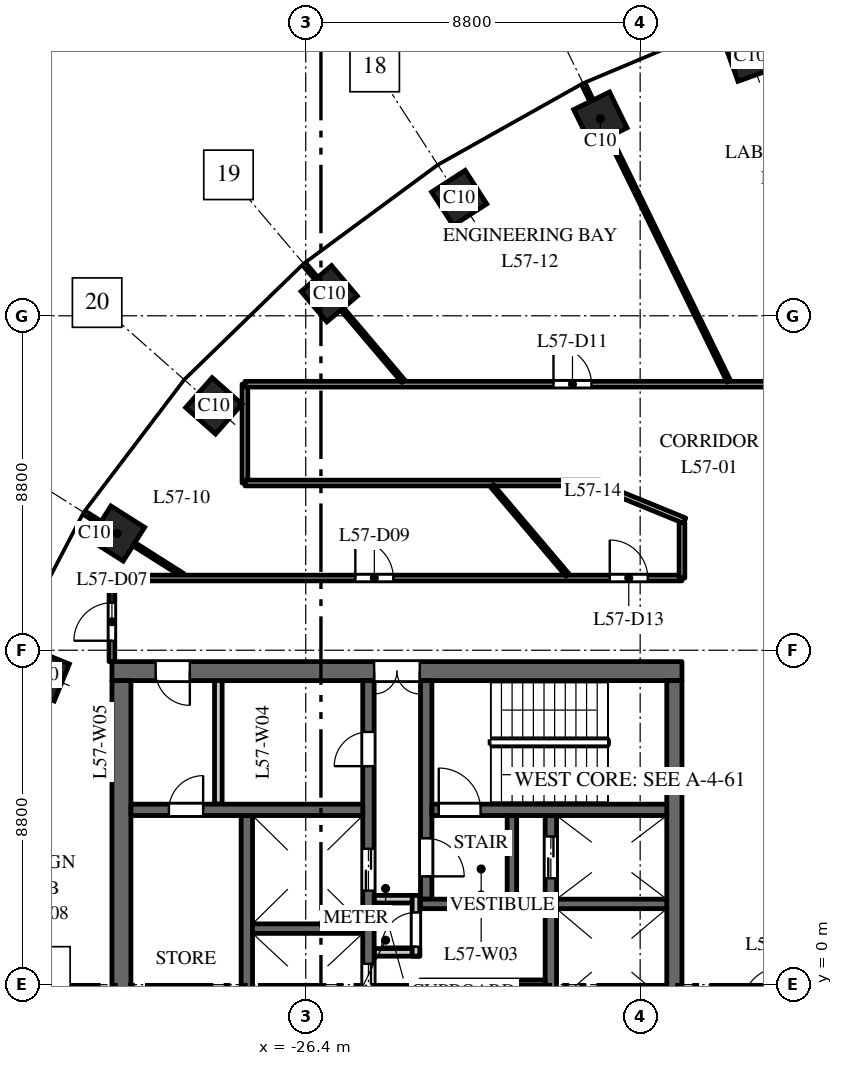
"""IFC4 building model, lengths in metres.
Left out: names, types, materials, properties, quantities, classifications, styles, units other than length and angle.
Written with IfcOpenShell. Run it as: python <this file> out.ifc"""

import sys

from ifc_helpers import new_model, si_unit, direction, frame, frame_2d, origin, origin_2d, place, context, subcontext, project, spatial, rectangle, extrude, element, fill, save


model = new_model("IFC4")
c1 = context("Model", 3, precision=1e-05, world=origin(), true_north=direction((0.0, 1.0)))
c2 = subcontext(c1, "Body", "Model", "MODEL_VIEW")
j1 = project(units=[si_unit("LENGTHUNIT", "METRE"), si_unit("PLANEANGLEUNIT", "RADIAN")], contexts=[c1])
p1 = place(None, origin())
s1 = spatial("IfcSite", under=j1, at=p1, CompositionType="ELEMENT")
p2 = place(p1, origin())
s2 = spatial("IfcBuilding", under=s1, at=p2, CompositionType="ELEMENT")
p3 = place(p2, frame((0.0, 0.0, 269.5)))
s3 = spatial("IfcBuildingStorey", under=s2, at=p3, CompositionType="ELEMENT", Elevation=269.5)
for number, where, z_axis, x_axis in (
    (1, (-14.709, 24.441, 0.0), (0.0, 0.0, 1.0), (-0.941, -0.338, 0.0)),
    (2, (-18.646, 22.785, 0.0), (0.0, 0.0, 1.0), (-0.898, -0.439, 0.0)),
    (3, (-22.362, 20.7, 0.0), (0.0, 0.0, 1.0), (-0.84, -0.542, 0.0)),
    (4, (-25.783, 18.18, 0.0), (0.0, 0.0, 1.0), (-0.763, -0.646, 0.0)),
    (5, (-28.819, 15.23, 0.0), (0.0, 0.0, 1.0), (-0.663, -0.749, 0.0)),
    (6, (-31.365, 11.871, 0.0), (0.0, 0.0, 1.0), (-0.535, -0.845, 0.0)),
    (7, (-33.305, 8.149, 0.0), (0.0, 0.0, 1.0), (-0.379, -0.925, 0.0)),
):
    element("IfcColumn", number, at=place(p3, frame(where, z_axis=z_axis, x_axis=x_axis)), inside=s3, PredefinedType="COLUMN", context=c2, shape_type="SweptSolid", body=[
        extrude(rectangle(XDim=1.05, YDim=1.05, at=origin_2d()), origin(), (0.0, 0.0, 1.0), 4.0),
    ])
p4 = place(p3, frame((-16.5, 8.25, 0.0), z_axis=(0.0, 0.0, 1.0), x_axis=(-1.0, 0.0, 0.0)))
e8 = element("IfcWall", 8, at=p4, inside=s3, PredefinedType="SHEAR", context=c2, shape_type="SweptSolid", body=[
    extrude(rectangle(XDim=15.0, YDim=0.5, at=frame_2d((7.5, 0.0))), origin(), (0.0, 0.0, 1.0), 3.7),
])
p5 = place(p4, frame((6.9, 0.0, 0.0)))
e9 = element("IfcOpeningElement", 9, at=p5, cuts=e8, PredefinedType="OPENING", context=c2, shape_type="SweptSolid", body=[
    extrude(rectangle(XDim=1.2, YDim=2.1, at=frame_2d((0.6, 1.05))), frame((0.0, 0.26, 0.0), z_axis=(0.0, -1.0, 0.0), x_axis=(1.0, 0.0, 0.0)), (0.0, 0.0, 1.0), 0.52),
])
p6 = place(p4, frame((12.95, 0.0, 0.0)))
e10 = element("IfcOpeningElement", 10, at=p6, cuts=e8, PredefinedType="OPENING", context=c2, shape_type="SweptSolid", body=[
    extrude(rectangle(XDim=0.9, YDim=2.1, at=frame_2d((0.45, 1.05))), frame((0.0, 0.26, 0.0), z_axis=(0.0, -1.0, 0.0), x_axis=(1.0, 0.0, 0.0)), (0.0, 0.0, 1.0), 0.52),
])
p7 = place(p3, frame((-27.95, -4.45, 0.0), z_axis=(0.0, 0.0, 1.0), x_axis=(0.0, 1.0, 0.0)))
e11 = element("IfcWall", 11, at=p7, inside=s3, PredefinedType="SHEAR", context=c2, shape_type="SweptSolid", body=[
    extrude(rectangle(XDim=8.9, YDim=0.3, at=frame_2d((4.45, 0.0))), origin(), (0.0, 0.0, 1.0), 3.7),
])
p8 = place(p3, frame((-19.95, -4.45, 0.0), z_axis=(0.0, 0.0, 1.0), x_axis=(0.0, 1.0, 0.0)))
e12 = element("IfcWall", 12, at=p8, inside=s3, PredefinedType="SHEAR", context=c2, shape_type="SweptSolid", body=[
    extrude(rectangle(XDim=8.9, YDim=0.3, at=frame_2d((4.45, 0.0))), origin(), (0.0, 0.0, 1.0), 3.7),
])
p9 = place(p8, frame((0.775, 0.0, 0.0)))
e13 = element("IfcOpeningElement", 13, at=p9, cuts=e12, PredefinedType="OPENING", context=c2, shape_type="SweptSolid", body=[
    extrude(rectangle(XDim=1.2, YDim=2.1, at=frame_2d((0.6, 1.05))), frame((0.0, 0.16, 0.0), z_axis=(0.0, -1.0, 0.0), x_axis=(1.0, 0.0, 0.0)), (0.0, 0.0, 1.0), 0.32),
])
p10 = place(p8, frame((7.25, 0.0, 0.0)))
e14 = element("IfcOpeningElement", 14, at=p10, cuts=e12, PredefinedType="OPENING", context=c2, shape_type="SweptSolid", body=[
    extrude(rectangle(XDim=1.1, YDim=2.1, at=frame_2d((0.55, 1.05))), frame((0.0, 0.16, 0.0), z_axis=(0.0, -1.0, 0.0), x_axis=(1.0, 0.0, 0.0)), (0.0, 0.0, 1.0), 0.32),
])
p11 = place(p3, frame((-24.75, -8.0, 0.0), z_axis=(0.0, 0.0, 1.0), x_axis=(0.0, 1.0, 0.0)))
e15 = element("IfcWall", 15, at=p11, inside=s3, PredefinedType="SHEAR", context=c2, shape_type="SweptSolid", body=[
    extrude(rectangle(XDim=16.0, YDim=0.3, at=frame_2d((8.0, 0.0))), origin(), (0.0, 0.0, 1.0), 3.7),
])
p12 = place(p11, frame((4.425, 0.0, 0.0)))
e16 = element("IfcOpeningElement", 16, at=p12, cuts=e15, PredefinedType="OPENING", context=c2, shape_type="SweptSolid", body=[
    extrude(rectangle(XDim=1.1, YDim=2.1, at=frame_2d((0.55, 1.05))), frame((0.0, 0.16, 0.0), z_axis=(0.0, -1.0, 0.0), x_axis=(1.0, 0.0, 0.0)), (0.0, 0.0, 1.0), 0.32),
])
p13 = place(p11, frame((7.45, 0.0, 0.0)))
e17 = element("IfcOpeningElement", 17, at=p13, cuts=e15, PredefinedType="OPENING", context=c2, shape_type="SweptSolid", body=[
    extrude(rectangle(XDim=1.1, YDim=2.1, at=frame_2d((0.55, 1.05))), frame((0.0, 0.16, 0.0), z_axis=(0.0, -1.0, 0.0), x_axis=(1.0, 0.0, 0.0)), (0.0, 0.0, 1.0), 0.32),
])
p14 = place(p11, frame((10.475, 0.0, 0.0)))
e18 = element("IfcOpeningElement", 18, at=p14, cuts=e15, PredefinedType="OPENING", context=c2, shape_type="SweptSolid", body=[
    extrude(rectangle(XDim=1.1, YDim=2.1, at=frame_2d((0.55, 1.05))), frame((0.0, 0.16, 0.0), z_axis=(0.0, -1.0, 0.0), x_axis=(1.0, 0.0, 0.0)), (0.0, 0.0, 1.0), 0.32),
])
p15 = place(p11, frame((13.75, 0.0, 0.0)))
e19 = element("IfcOpeningElement", 19, at=p15, cuts=e15, PredefinedType="OPENING", context=c2, shape_type="SweptSolid", body=[
    extrude(rectangle(XDim=0.9, YDim=2.1, at=frame_2d((0.45, 1.05))), frame((0.0, 0.16, 0.0), z_axis=(0.0, -1.0, 0.0), x_axis=(1.0, 0.0, 0.0)), (0.0, 0.0, 1.0), 0.32),
])
p16 = place(p11, frame((1.35, 0.0, 0.0)))
e20 = element("IfcOpeningElement", 20, at=p16, cuts=e15, PredefinedType="OPENING", context=c2, shape_type="SweptSolid", body=[
    extrude(rectangle(XDim=0.9, YDim=2.1, at=frame_2d((0.45, 1.05))), frame((0.0, 0.16, 0.0), z_axis=(0.0, -1.0, 0.0), x_axis=(1.0, 0.0, 0.0)), (0.0, 0.0, 1.0), 0.32),
])
p17 = place(p3, frame((-20.1, 0.0, 0.0), z_axis=(0.0, 0.0, 1.0), x_axis=(-1.0, 0.0, 0.0)))
e21 = element("IfcWall", 21, at=p17, inside=s3, PredefinedType="SHEAR", context=c2, shape_type="SweptSolid", body=[
    extrude(rectangle(XDim=3.28, YDim=0.25, at=frame_2d((1.64, 0.0))), origin(), (0.0, 0.0, 1.0), 3.7),
])
p18 = place(p3, frame((-16.7, -8.0, 0.0), z_axis=(0.0, 0.0, 1.0), x_axis=(0.0, 1.0, 0.0)))
e22 = element("IfcWall", 22, at=p18, inside=s3, PredefinedType="SHEAR", context=c2, shape_type="SweptSolid", body=[
    extrude(rectangle(XDim=16.0, YDim=0.4, at=frame_2d((8.0, 0.0))), origin(), (0.0, 0.0, 1.0), 3.7),
])
for number, where, z_axis, x_axis in (
    (23, (-23.4, 0.85, 0.0), (0.0, 0.0, 1.0), (-1.0, 0.0, 0.0)),
    (24, (-23.4, 2.25, 0.0), (0.0, 0.0, 1.0), (-1.0, 0.0, 0.0)),
):
    element("IfcWall", number, at=place(p3, frame(where, z_axis=z_axis, x_axis=x_axis)), inside=s3, PredefinedType="PARTITIONING", context=c2, shape_type="SweptSolid", body=[
        extrude(rectangle(XDim=1.2, YDim=0.2, at=frame_2d((0.6, 0.0))), origin(), (0.0, 0.0, 1.0), 3.7),
    ])
p19 = place(p3, frame((-23.5, 0.75, 0.0), z_axis=(0.0, 0.0, 1.0), x_axis=(0.0, 1.0, 0.0)))
e25 = element("IfcWall", 25, at=p19, inside=s3, PredefinedType="PARTITIONING", context=c2, shape_type="SweptSolid", body=[
    extrude(rectangle(XDim=1.6, YDim=0.2, at=frame_2d((0.8, 0.0))), origin(), (0.0, 0.0, 1.0), 3.7),
])
p20 = place(p19, frame((0.25, 0.0, 0.0)))
e26 = element("IfcOpeningElement", 26, at=p20, cuts=e25, PredefinedType="OPENING", context=c2, shape_type="SweptSolid", body=[
    extrude(rectangle(XDim=0.9, YDim=2.1, at=frame_2d((0.45, 1.05))), frame((0.0, 0.11, 0.0), z_axis=(0.0, -1.0, 0.0), x_axis=(1.0, 0.0, 0.0)), (0.0, 0.0, 1.0), 0.22),
])
p21 = place(p3, frame((-31.25, -8.0, 0.0), z_axis=(0.0, 0.0, 1.0), x_axis=(0.0, 1.0, 0.0)))
e27 = element("IfcWall", 27, at=p21, inside=s3, PredefinedType="SHEAR", context=c2, shape_type="SweptSolid", body=[
    extrude(rectangle(XDim=16.0, YDim=0.5, at=frame_2d((8.0, 0.0))), origin(), (0.0, 0.0, 1.0), 3.7),
])
p22 = place(p3, frame((-24.9, 4.6, 0.0), z_axis=(0.0, 0.0, 1.0), x_axis=(-1.0, 0.0, 0.0)))
e28 = element("IfcWall", 28, at=p22, inside=s3, PredefinedType="SHEAR", context=c2, shape_type="SweptSolid", body=[
    extrude(rectangle(XDim=6.1, YDim=0.3, at=frame_2d((3.05, 0.0))), origin(), (0.0, 0.0, 1.0), 3.7),
])
p23 = place(p22, frame((4.2, 0.0, 0.0)))
e29 = element("IfcOpeningElement", 29, at=p23, cuts=e28, PredefinedType="OPENING", context=c2, shape_type="SweptSolid", body=[
    extrude(rectangle(XDim=0.9, YDim=2.1, at=frame_2d((0.45, 1.05))), frame((0.0, 0.16, 0.0), z_axis=(0.0, -1.0, 0.0), x_axis=(1.0, 0.0, 0.0)), (0.0, 0.0, 1.0), 0.32),
])
p24 = place(p3, frame((-28.7, 4.75, 0.0), z_axis=(0.0, 0.0, 1.0), x_axis=(0.0, 1.0, 0.0)))
e30 = element("IfcWall", 30, at=p24, inside=s3, PredefinedType="PARTITIONING", context=c2, shape_type="SweptSolid", body=[
    extrude(rectangle(XDim=3.25, YDim=0.2, at=frame_2d((1.625, 0.0))), origin(), (0.0, 0.0, 1.0), 3.7),
])
for number, where, z_axis, x_axis in (
    (31, (-16.9, 2.125, 0.0), (0.0, 0.0, 1.0), (-1.0, 0.0, 0.0)),
    (32, (-24.9, 1.475, 0.0), (0.0, 0.0, 1.0), (-1.0, 0.0, 0.0)),
):
    element("IfcWall", number, at=place(p3, frame(where, z_axis=z_axis, x_axis=x_axis)), inside=s3, PredefinedType="SHEAR", context=c2, shape_type="SweptSolid", body=[
        extrude(rectangle(XDim=2.9, YDim=0.25, at=frame_2d((1.45, 0.0))), origin(), (0.0, 0.0, 1.0), 3.7),
    ])
p25 = place(p3, frame((-23.23, 2.25, 0.0), z_axis=(0.0, 0.0, 1.0), x_axis=(0.0, 1.0, 0.0)))
e33 = element("IfcWall", 33, at=p25, inside=s3, PredefinedType="SHEAR", context=c2, shape_type="SweptSolid", body=[
    extrude(rectangle(XDim=5.75, YDim=0.3, at=frame_2d((2.875, 0.0))), origin(), (0.0, 0.0, 1.0), 3.7),
])
p26 = place(p25, frame((0.6, 0.0, 0.0)))
e34 = element("IfcOpeningElement", 34, at=p26, cuts=e33, PredefinedType="OPENING", context=c2, shape_type="SweptSolid", body=[
    extrude(rectangle(XDim=1.0, YDim=2.1, at=frame_2d((0.5, 1.05))), frame((0.0, 0.16, 0.0), z_axis=(0.0, -1.0, 0.0), x_axis=(1.0, 0.0, 0.0)), (0.0, 0.0, 1.0), 0.32),
])
p27 = place(p3, frame((-16.9, 4.6, 0.0), z_axis=(0.0, 0.0, 1.0), x_axis=(-1.0, 0.0, 0.0)))
e35 = element("IfcWall", 35, at=p27, inside=s3, PredefinedType="SHEAR", context=c2, shape_type="SweptSolid", body=[
    extrude(rectangle(XDim=6.18, YDim=0.3, at=frame_2d((3.09, 0.0))), origin(), (0.0, 0.0, 1.0), 3.7),
])
p28 = place(p27, frame((4.9, 0.0, 0.0)))
e36 = element("IfcOpeningElement", 36, at=p28, cuts=e35, PredefinedType="OPENING", context=c2, shape_type="SweptSolid", body=[
    extrude(rectangle(XDim=1.1, YDim=2.1, at=frame_2d((0.55, 1.05))), frame((0.0, 0.16, 0.0), z_axis=(0.0, -1.0, 0.0), x_axis=(1.0, 0.0, 0.0)), (0.0, 0.0, 1.0), 0.32),
])
p29 = place(p3, frame((-20.85, 2.125, 0.0), z_axis=(0.0, 0.0, 1.0), x_axis=(-1.0, 0.0, 0.0)))
e37 = element("IfcWall", 37, at=p29, inside=s3, PredefinedType="SHEAR", context=c2, shape_type="SweptSolid", body=[
    extrude(rectangle(XDim=2.53, YDim=0.25, at=frame_2d((1.265, 0.0))), origin(), (0.0, 0.0, 1.0), 3.7),
])
p30 = place(p3, frame((-20.975, 2.25, 0.0), z_axis=(0.0, 0.0, 1.0), x_axis=(0.0, 1.0, 0.0)))
e38 = element("IfcWall", 38, at=p30, inside=s3, PredefinedType="SHEAR", context=c2, shape_type="SweptSolid", body=[
    extrude(rectangle(XDim=2.2, YDim=0.25, at=frame_2d((1.1, 0.0))), origin(), (0.0, 0.0, 1.0), 3.7),
])
p31 = place(p3, frame((-32.212, 12.408, 0.0), z_axis=(0.0, 0.0, 1.0), x_axis=(0.844810627195, -0.535065420467, 0.0)))
e39 = element("IfcWall", 39, at=p31, inside=s3, PredefinedType="PARTITIONING", context=c2, shape_type="SweptSolid", body=[
    extrude(rectangle(XDim=3.048, YDim=0.1, at=frame_2d((1.524, 0.0))), origin(), (0.0, 0.0, 1.0), 3.7),
])
p32 = place(p3, frame((-31.5, 8.5, 0.0), z_axis=(0.0, 0.0, 1.0), x_axis=(0.0, 1.0, 0.0)))
e40 = element("IfcWall", 40, at=p32, inside=s3, PredefinedType="PARTITIONING", context=c2, shape_type="SweptSolid", body=[
    extrude(rectangle(XDim=2.2, YDim=0.15, at=frame_2d((1.1, 0.0))), origin(), (0.0, 0.0, 1.0), 3.7),
])
p33 = place(p32, frame((0.55, 0.0, 0.0)))
e41 = element("IfcOpeningElement", 41, at=p33, cuts=e40, PredefinedType="OPENING", context=c2, shape_type="SweptSolid", body=[
    extrude(rectangle(XDim=1.0, YDim=2.1, at=frame_2d((0.5, 1.05))), frame((0.0, 0.085, 0.0), z_axis=(0.0, -1.0, 0.0), x_axis=(1.0, 0.0, 0.0)), (0.0, 0.0, 1.0), 0.17),
])
p34 = place(p3, frame((-31.5, 10.7, 0.0), z_axis=(0.0, 0.0, 1.0), x_axis=(1.0, 0.0, 0.0)))
e42 = element("IfcWall", 42, at=p34, inside=s3, PredefinedType="PARTITIONING", context=c2, shape_type="SweptSolid", body=[
    extrude(rectangle(XDim=15.0, YDim=0.15, at=frame_2d((7.5, 0.0))), origin(), (0.0, 0.0, 1.0), 3.1),
])
p35 = place(p34, frame((6.405, 0.0, 0.0)))
e43 = element("IfcOpeningElement", 43, at=p35, cuts=e42, PredefinedType="OPENING", context=c2, shape_type="SweptSolid", body=[
    extrude(rectangle(XDim=1.0, YDim=2.1, at=frame_2d((0.5, 1.05))), frame((0.0, 0.085, 0.0), z_axis=(0.0, -1.0, 0.0), x_axis=(1.0, 0.0, 0.0)), (0.0, 0.0, 1.0), 0.17),
])
p36 = place(p34, frame((13.1, 0.0, 0.0)))
e44 = element("IfcOpeningElement", 44, at=p36, cuts=e42, PredefinedType="OPENING", context=c2, shape_type="SweptSolid", body=[
    extrude(rectangle(XDim=1.0, YDim=2.1, at=frame_2d((0.5, 1.05))), frame((0.0, 0.085, 0.0), z_axis=(0.0, -1.0, 0.0), x_axis=(1.0, 0.0, 0.0)), (0.0, 0.0, 1.0), 0.17),
])
p37 = place(p3, frame((-28.0, 13.2, 0.0), z_axis=(0.0, 0.0, 1.0), x_axis=(0.0, 1.0, 0.0)))
e45 = element("IfcWall", 45, at=p37, inside=s3, PredefinedType="PARTITIONING", context=c2, shape_type="SweptSolid", body=[
    extrude(rectangle(XDim=2.6, YDim=0.15, at=frame_2d((1.3, 0.0))), origin(), (0.0, 0.0, 1.0), 3.0),
])
p38 = place(p3, frame((-28.0, 13.2, 0.0), z_axis=(0.0, 0.0, 1.0), x_axis=(1.0, 0.0, 0.0)))
e46 = element("IfcWall", 46, at=p38, inside=s3, PredefinedType="PARTITIONING", context=c2, shape_type="SweptSolid", body=[
    extrude(rectangle(XDim=9.347, YDim=0.15, at=frame_2d((4.673, 0.0))), origin(), (0.0, 0.0, 1.0), 2.75),
])
p39 = place(p3, frame((-28.0, 15.8, 0.0), z_axis=(0.0, 0.0, 1.0), x_axis=(1.0, 0.0, 0.0)))
e47 = element("IfcWall", 47, at=p39, inside=s3, PredefinedType="PARTITIONING", context=c2, shape_type="SweptSolid", body=[
    extrude(rectangle(XDim=19.809, YDim=0.15, at=frame_2d((9.905, 0.0))), origin(), (0.0, 0.0, 1.0), 2.75),
])
p40 = place(p39, frame((8.119, 0.0, 0.0)))
e48 = element("IfcOpeningElement", 48, at=p40, cuts=e47, PredefinedType="OPENING", context=c2, shape_type="SweptSolid", body=[
    extrude(rectangle(XDim=1.0, YDim=2.1, at=frame_2d((0.5, 1.05))), frame((0.0, 0.085, 0.0), z_axis=(0.0, -1.0, 0.0), x_axis=(1.0, 0.0, 0.0)), (0.0, 0.0, 1.0), 0.17),
])
p41 = place(p39, frame((15.909, 0.0, 0.0)))
e49 = element("IfcOpeningElement", 49, at=p41, cuts=e47, PredefinedType="OPENING", context=c2, shape_type="SweptSolid", body=[
    extrude(rectangle(XDim=1.0, YDim=2.1, at=frame_2d((0.5, 1.05))), frame((0.0, 0.085, 0.0), z_axis=(0.0, -1.0, 0.0), x_axis=(1.0, 0.0, 0.0)), (0.0, 0.0, 1.0), 0.17),
])
p42 = place(p3, frame((-26.43, 18.945, 0.0), z_axis=(0.0, 0.0, 1.0), x_axis=(0.646323350317, -0.763063645337, 0.0)))
e50 = element("IfcWall", 50, at=p42, inside=s3, PredefinedType="PARTITIONING", context=c2, shape_type="SweptSolid", body=[
    extrude(rectangle(XDim=4.02, YDim=0.1, at=frame_2d((2.01, 0.0))), origin(), (0.0, 0.0, 1.0), 2.75),
])
p43 = place(p3, frame((-21.499, 13.125, 0.0), z_axis=(0.0, 0.0, 1.0), x_axis=(0.646354899778, -0.763036921474, 0.0)))
e51 = element("IfcWall", 51, at=p43, inside=s3, PredefinedType="PARTITIONING", context=c2, shape_type="SweptSolid", body=[
    extrude(rectangle(XDim=3.076, YDim=0.1, at=frame_2d((1.538, 0.0))), origin(), (0.0, 0.0, 1.0), 3.7),
])
p44 = place(p3, frame((-19.086, 23.685, 0.0), z_axis=(0.0, 0.0, 1.0), x_axis=(0.439174872977, -0.898401597809, 0.0)))
e52 = element("IfcWall", 52, at=p44, inside=s3, PredefinedType="PARTITIONING", context=c2, shape_type="SweptSolid", body=[
    extrude(rectangle(XDim=8.693, YDim=0.1, at=frame_2d((4.347, 0.0))), origin(), (0.0, 0.0, 1.0), 2.85),
])
p45 = place(p3, frame((-18.664, 13.123, 0.0), z_axis=(0.0, 0.0, 1.0), x_axis=(0.925590432986, -0.378526551731, 0.0)))
e53 = element("IfcWall", 53, at=p45, inside=s3, PredefinedType="PARTITIONING", context=c2, shape_type="SweptSolid", body=[
    extrude(rectangle(XDim=2.415, YDim=0.15, at=frame_2d((1.208, 0.0))), origin(), (0.0, 0.0, 1.0), 2.75),
])
p46 = place(p3, frame((-16.5, 10.7, 0.0), z_axis=(0.0, 0.0, 1.0), x_axis=(0.0, 1.0, 0.0)))
e54 = element("IfcWall", 54, at=p46, inside=s3, PredefinedType="PARTITIONING", context=c2, shape_type="SweptSolid", body=[
    extrude(rectangle(XDim=1.457, YDim=0.15, at=frame_2d((0.729, 0.0))), origin(), (0.0, 0.0, 1.0), 2.75),
])
p47 = place(p10, origin())
e55 = element("IfcDoor", 55, at=p47, inside=s3, OperationType="DOUBLE_DOOR_SLIDING", PredefinedType="DOOR", context=c2, shape_type="SweptSolid", body=[
    extrude(rectangle(XDim=1.1, YDim=2.1, at=frame_2d((0.55, 1.05))), frame((0.0, 0.025, 0.0), z_axis=(0.0, -1.0, 0.0), x_axis=(1.0, 0.0, 0.0)), (0.0, 0.0, 1.0), 0.05),
])
fill(e14, e55)
p48 = place(p13, origin())
e56 = element("IfcDoor", 56, at=p48, inside=s3, OperationType="DOUBLE_DOOR_SLIDING", PredefinedType="DOOR", context=c2, shape_type="SweptSolid", body=[
    extrude(rectangle(XDim=1.1, YDim=2.1, at=frame_2d((0.55, 1.05))), frame((0.0, 0.025, 0.0), z_axis=(0.0, -1.0, 0.0), x_axis=(1.0, 0.0, 0.0)), (0.0, 0.0, 1.0), 0.05),
])
fill(e17, e56)
p49 = place(p14, origin())
e57 = element("IfcDoor", 57, at=p49, inside=s3, OperationType="DOUBLE_DOOR_SLIDING", PredefinedType="DOOR", context=c2, shape_type="SweptSolid", body=[
    extrude(rectangle(XDim=1.1, YDim=2.1, at=frame_2d((0.55, 1.05))), frame((0.0, 0.025, 0.0), z_axis=(0.0, -1.0, 0.0), x_axis=(1.0, 0.0, 0.0)), (0.0, 0.0, 1.0), 0.05),
])
fill(e18, e57)
p50 = place(p28, origin())
e58 = element("IfcDoor", 58, at=p50, inside=s3, OperationType="SINGLE_SWING_RIGHT", PredefinedType="DOOR", context=c2, shape_type="SweptSolid", body=[
    extrude(rectangle(XDim=1.1, YDim=2.1, at=frame_2d((0.55, 1.05))), frame((0.0, 0.025, 0.0), z_axis=(0.0, -1.0, 0.0), x_axis=(1.0, 0.0, 0.0)), (0.0, 0.0, 1.0), 0.05),
])
fill(e36, e58)
p51 = place(p26, origin())
e59 = element("IfcDoor", 59, at=p51, inside=s3, OperationType="SINGLE_SWING_LEFT", PredefinedType="DOOR", context=c2, shape_type="SweptSolid", body=[
    extrude(rectangle(XDim=1.0, YDim=2.1, at=frame_2d((0.5, 1.05))), frame((0.0, 0.025, 0.0), z_axis=(0.0, -1.0, 0.0), x_axis=(1.0, 0.0, 0.0)), (0.0, 0.0, 1.0), 0.05),
])
fill(e34, e59)
p52 = place(p5, origin())
e60 = element("IfcDoor", 60, at=p52, inside=s3, OperationType="DOUBLE_DOOR_DOUBLE_SWING", PredefinedType="DOOR", context=c2, shape_type="SweptSolid", body=[
    extrude(rectangle(XDim=1.2, YDim=2.1, at=frame_2d((0.6, 1.05))), frame((0.0, 0.025, 0.0), z_axis=(0.0, -1.0, 0.0), x_axis=(1.0, 0.0, 0.0)), (0.0, 0.0, 1.0), 0.05),
])
fill(e9, e60)
p53 = place(p15, origin())
e61 = element("IfcDoor", 61, at=p53, inside=s3, OperationType="SINGLE_SWING_RIGHT", PredefinedType="DOOR", context=c2, shape_type="SweptSolid", body=[
    extrude(rectangle(XDim=0.9, YDim=2.1, at=frame_2d((0.45, 1.05))), frame((0.0, 0.025, 0.0), z_axis=(0.0, -1.0, 0.0), x_axis=(1.0, 0.0, 0.0)), (0.0, 0.0, 1.0), 0.05),
])
fill(e19, e61)
p54 = place(p6, origin())
e62 = element("IfcDoor", 62, at=p54, inside=s3, OperationType="SINGLE_SWING_RIGHT", PredefinedType="DOOR", context=c2, shape_type="SweptSolid", body=[
    extrude(rectangle(XDim=0.9, YDim=2.1, at=frame_2d((0.45, 1.05))), frame((0.0, 0.025, 0.0), z_axis=(0.0, -1.0, 0.0), x_axis=(1.0, 0.0, 0.0)), (0.0, 0.0, 1.0), 0.05),
])
fill(e10, e62)
p55 = place(p20, origin())
e63 = element("IfcDoor", 63, at=p55, inside=s3, OperationType="SINGLE_SWING_RIGHT", PredefinedType="DOOR", context=c2, shape_type="SweptSolid", body=[
    extrude(rectangle(XDim=0.9, YDim=2.1, at=frame_2d((0.45, 1.05))), frame((0.0, 0.025, 0.0), z_axis=(0.0, -1.0, 0.0), x_axis=(1.0, 0.0, 0.0)), (0.0, 0.0, 1.0), 0.05),
])
fill(e26, e63)
p56 = place(p23, origin())
e64 = element("IfcDoor", 64, at=p56, inside=s3, OperationType="SINGLE_SWING_LEFT", PredefinedType="DOOR", context=c2, shape_type="SweptSolid", body=[
    extrude(rectangle(XDim=0.9, YDim=2.1, at=frame_2d((0.45, 1.05))), frame((0.0, 0.025, 0.0), z_axis=(0.0, -1.0, 0.0), x_axis=(1.0, 0.0, 0.0)), (0.0, 0.0, 1.0), 0.05),
])
fill(e29, e64)
p57 = place(p33, origin())
e65 = element("IfcDoor", 65, at=p57, inside=s3, OperationType="SINGLE_SWING_LEFT", PredefinedType="DOOR", context=c2, shape_type="SweptSolid", body=[
    extrude(rectangle(XDim=1.0, YDim=2.1, at=frame_2d((0.5, 1.05))), frame((0.0, 0.025, 0.0), z_axis=(0.0, -1.0, 0.0), x_axis=(1.0, 0.0, 0.0)), (0.0, 0.0, 1.0), 0.05),
])
fill(e41, e65)
p58 = place(p35, origin())
e66 = element("IfcDoor", 66, at=p58, inside=s3, OperationType="SINGLE_SWING_LEFT", PredefinedType="DOOR", context=c2, shape_type="SweptSolid", body=[
    extrude(rectangle(XDim=1.0, YDim=2.1, at=frame_2d((0.5, 1.05))), frame((0.0, 0.025, 0.0), z_axis=(0.0, -1.0, 0.0), x_axis=(1.0, 0.0, 0.0)), (0.0, 0.0, 1.0), 0.05),
])
fill(e43, e66)
p59 = place(p40, origin())
e67 = element("IfcDoor", 67, at=p59, inside=s3, OperationType="SINGLE_SWING_LEFT", PredefinedType="DOOR", context=c2, shape_type="SweptSolid", body=[
    extrude(rectangle(XDim=1.0, YDim=2.1, at=frame_2d((0.5, 1.05))), frame((0.0, 0.025, 0.0), z_axis=(0.0, -1.0, 0.0), x_axis=(1.0, 0.0, 0.0)), (0.0, 0.0, 1.0), 0.05),
])
fill(e48, e67)
p60 = place(p36, origin())
e68 = element("IfcDoor", 68, at=p60, inside=s3, OperationType="SINGLE_SWING_LEFT", PredefinedType="DOOR", context=c2, shape_type="SweptSolid", body=[
    extrude(rectangle(XDim=1.0, YDim=2.1, at=frame_2d((0.5, 1.05))), frame((0.0, 0.025, 0.0), z_axis=(0.0, -1.0, 0.0), x_axis=(1.0, 0.0, 0.0)), (0.0, 0.0, 1.0), 0.05),
])
fill(e44, e68)
save(model, sys.argv[1])
